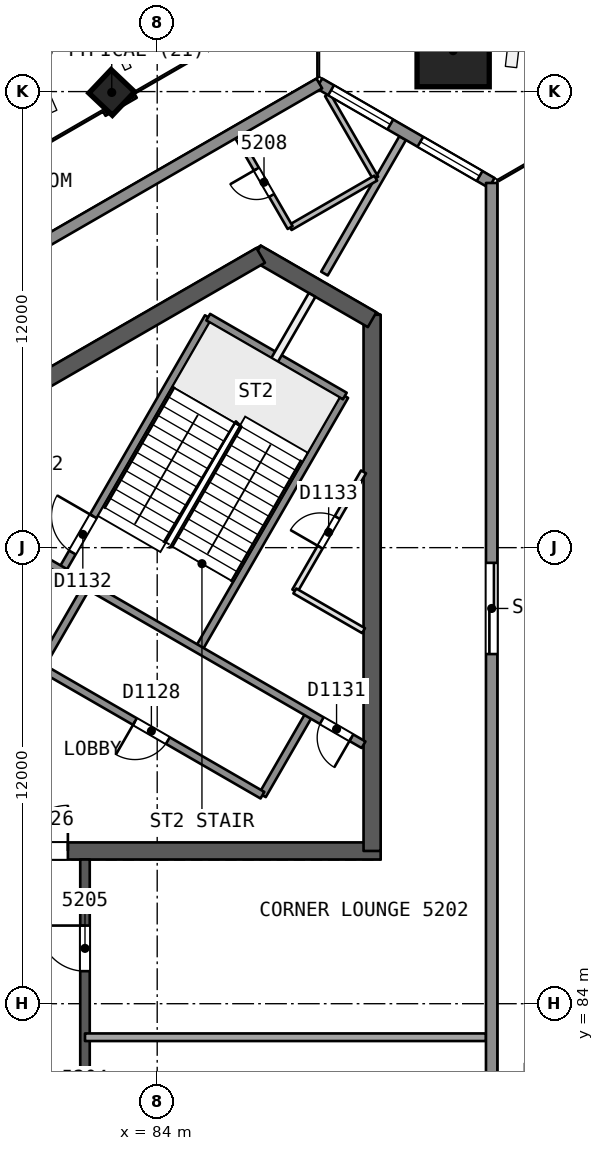
"""IFC4 building model, lengths in metres.
Left out: names, types, materials, properties, quantities, classifications, styles, units other than length and angle.
Written with IfcOpenShell. Run it as: python <this file> out.ifc"""

import sys

from ifc_helpers import new_model, si_unit, direction, frame, frame_2d, origin, origin_2d, place, context, subcontext, project, spatial, rectangle, extrude, element, fill, save


model = new_model("IFC4")
c1 = context("Model", 3, precision=1e-05, world=origin(), true_north=direction((0.0, 1.0)))
c2 = subcontext(c1, "Body", "Model", "MODEL_VIEW")
j1 = project(units=[si_unit("LENGTHUNIT", "METRE"), si_unit("PLANEANGLEUNIT", "RADIAN")], contexts=[c1])
p1 = place(None, origin())
s1 = spatial("IfcSite", under=j1, at=p1, CompositionType="ELEMENT")
p2 = place(p1, origin())
s2 = spatial("IfcBuilding", under=s1, at=p2, CompositionType="ELEMENT")
p3 = place(p2, frame((0.0, 0.0, 213.2)))
s3 = spatial("IfcBuildingStorey", under=s2, at=p3, CompositionType="ELEMENT", Elevation=213.2)
p4 = place(p3, frame((79.63, 88.019, 0.0), z_axis=(0.0, 0.0, 1.0), x_axis=(1.0, 0.0, 0.0)))
e1 = element("IfcWall", 1, at=p4, inside=s3, PredefinedType="SHEAR", context=c2, shape_type="SweptSolid", body=[
    extrude(rectangle(XDim=10.25, YDim=0.45, at=frame_2d((5.125, 0.0))), origin(), (0.0, 0.0, 1.0), 3.7),
])
p5 = place(p4, frame((0.82, 0.0, 0.0)))
e2 = element("IfcOpeningElement", 2, at=p5, cuts=e1, PredefinedType="OPENING", context=c2, shape_type="SweptSolid", body=[
    extrude(rectangle(XDim=1.2, YDim=2.1, at=frame_2d((0.6, 1.05))), frame((0.0, 0.235, 0.0), z_axis=(0.0, -1.0, 0.0), x_axis=(1.0, 0.0, 0.0)), (0.0, 0.0, 1.0), 0.471),
])
p6 = place(p3, frame((89.655, 88.019, 0.0), z_axis=(0.0, 0.0, 1.0), x_axis=(0.0, 1.0, 0.0)))
e3 = element("IfcWall", 3, at=p6, inside=s3, PredefinedType="SHEAR", context=c2, shape_type="SweptSolid", body=[
    extrude(rectangle(XDim=14.108, YDim=0.45, at=frame_2d((7.054, 0.0))), origin(), (0.0, 0.0, 1.0), 3.7),
])
p7 = place(p3, frame((89.655, 101.998, 0.0), z_axis=(0.0, 0.0, 1.0), x_axis=(-0.866042179588, 0.49997094233, 0.0)))
e4 = element("IfcWall", 4, at=p7, inside=s3, PredefinedType="SHEAR", context=c2, shape_type="SweptSolid", body=[
    extrude(rectangle(XDim=3.515, YDim=0.45, at=frame_2d((1.758, 0.0))), origin(), (0.0, 0.0, 1.0), 3.7),
])
p8 = place(p3, frame((86.723, 103.69, 0.0), z_axis=(0.0, 0.0, 1.0), x_axis=(-0.866022713978, -0.500004658852, 0.0)))
e5 = element("IfcWall", 5, at=p8, inside=s3, PredefinedType="SHEAR", context=c2, shape_type="SweptSolid", body=[
    extrude(rectangle(XDim=14.203, YDim=0.45, at=frame_2d((7.102, 0.0))), origin(), (0.0, 0.0, 1.0), 3.7),
])
p9 = place(p3, frame((82.1, 72.206, 0.0), z_axis=(0.0, 0.0, 1.0), x_axis=(0.0, 1.0, 0.0)))
e6 = element("IfcWall", 6, at=p9, inside=s3, PredefinedType="SHEAR", context=c2, shape_type="SweptSolid", body=[
    extrude(rectangle(XDim=15.588, YDim=0.25, at=frame_2d((7.794, 0.0))), origin(), (0.0, 0.0, 1.0), 3.3),
])
p10 = place(p9, frame((2.618, 0.0, 0.0)))
e7 = element("IfcOpeningElement", 7, at=p10, cuts=e6, PredefinedType="OPENING", context=c2, shape_type="SweptSolid", body=[
    extrude(rectangle(XDim=1.0, YDim=2.1, at=frame_2d((0.5, 1.05))), frame((0.0, 0.135, 0.0), z_axis=(0.0, -1.0, 0.0), x_axis=(1.0, 0.0, 0.0)), (0.0, 0.0, 1.0), 0.271),
])
p11 = place(p9, frame((7.974, 0.0, 0.0)))
e8 = element("IfcOpeningElement", 8, at=p11, cuts=e6, PredefinedType="OPENING", context=c2, shape_type="SweptSolid", body=[
    extrude(rectangle(XDim=1.2, YDim=2.4, at=frame_2d((0.6, 1.2))), frame((0.0, 0.135, 0.0), z_axis=(0.0, -1.0, 0.0), x_axis=(1.0, 0.0, 0.0)), (0.0, 0.0, 1.0), 0.271),
])
p12 = place(p9, frame((12.65, 0.0, 0.0)))
e9 = element("IfcOpeningElement", 9, at=p12, cuts=e6, PredefinedType="OPENING", context=c2, shape_type="SweptSolid", body=[
    extrude(rectangle(XDim=1.2, YDim=2.4, at=frame_2d((0.6, 1.2))), frame((0.0, 0.135, 0.0), z_axis=(0.0, -1.0, 0.0), x_axis=(1.0, 0.0, 0.0)), (0.0, 0.0, 1.0), 0.271),
])
p13 = place(p3, frame((91.809, 109.114, 0.0), z_axis=(-0.017607001884, -0.030531992032, 0.999378702468), x_axis=(0.866280455458, -0.499557977108, 1.01498e-07)))
e10 = element("IfcColumn", 10, at=p13, inside=s3, PredefinedType="COLUMN", context=c2, shape_type="SweptSolid", body=[
    extrude(rectangle(XDim=1.9, YDim=1.9, at=origin_2d()), origin(), (0.0, 0.0, 1.0), 3.702),
])
p14 = place(p3, frame((82.814, 108.011, 0.0), z_axis=(-0.00837646992, -0.028097450282, 0.999570091609), x_axis=(0.866168540849, 0.499298149106, 0.021293593943)))
e11 = element("IfcColumn", 11, at=p14, inside=s3, PredefinedType="COLUMN", context=c2, shape_type="SweptSolid", body=[
    extrude(rectangle(XDim=0.85, YDim=0.85, at=origin_2d()), origin(), (0.0, 0.0, 1.0), 3.702),
])
p15 = place(p3, frame((92.652, 83.118, 0.0), z_axis=(0.0, 0.0, 1.0), x_axis=(-1.0, 0.0, 0.0)))
e12 = element("IfcWall", 12, at=p15, inside=s3, PredefinedType="PARTITIONING", context=c2, shape_type="SweptSolid", body=[
    extrude(rectangle(XDim=10.552, YDim=0.2, at=frame_2d((5.276, 0.0))), origin(), (0.0, 0.0, 1.0), 3.3),
])
p16 = place(p3, frame((90.459, 106.776, 0.0), z_axis=(0.0, 0.0, 1.0), x_axis=(-0.499979154163, -0.8660374388, 0.0)))
e13 = element("IfcWall", 13, at=p16, inside=s3, PredefinedType="PARTITIONING", context=c2, shape_type="SweptSolid", body=[
    extrude(rectangle(XDim=4.116, YDim=0.2, at=frame_2d((2.058, 0.0))), origin(), (0.0, 0.0, 1.0), 3.3),
])
p17 = place(p3, frame((88.483, 107.917, 0.0), z_axis=(0.0, 0.0, 1.0), x_axis=(0.499983796486, -0.866034758685, 0.0)))
e14 = element("IfcWall", 14, at=p17, inside=s3, PredefinedType="PARTITIONING", context=c2, shape_type="SweptSolid", body=[
    extrude(rectangle(XDim=2.534, YDim=0.15, at=frame_2d((1.267, 0.0))), origin(), (0.0, 0.0, 1.0), 3.3),
])
p18 = place(p3, frame((89.75, 105.723, 0.0), z_axis=(0.0, 0.0, 1.0), x_axis=(-0.866021400173, -0.500006934395, 0.0)))
e15 = element("IfcWall", 15, at=p18, inside=s3, PredefinedType="PARTITIONING", context=c2, shape_type="SweptSolid", body=[
    extrude(rectangle(XDim=2.6, YDim=0.15, at=frame_2d((1.3, 0.0))), origin(), (0.0, 0.0, 1.0), 3.3),
])
p19 = place(p3, frame((87.498, 104.423, 0.0), z_axis=(0.0, 0.0, 1.0), x_axis=(-0.499947816978, 0.86605552957, 0.0)))
e16 = element("IfcWall", 16, at=p19, inside=s3, PredefinedType="PARTITIONING", context=c2, shape_type="SweptSolid", body=[
    extrude(rectangle(XDim=2.751, YDim=0.15, at=frame_2d((1.375, 0.0))), origin(), (0.0, 0.0, 1.0), 3.3),
])
p20 = place(p19, frame((0.975, 0.0, 0.0)))
e17 = element("IfcOpeningElement", 17, at=p20, cuts=e16, PredefinedType="OPENING", context=c2, shape_type="SweptSolid", body=[
    extrude(rectangle(XDim=0.8, YDim=2.1, at=frame_2d((0.4, 1.05))), frame((0.0, 0.085, 0.0), z_axis=(0.0, -1.0, 0.0), x_axis=(1.0, 0.0, 0.0)), (0.0, 0.0, 1.0), 0.171),
])
p21 = place(p3, frame((88.266, 108.214, 0.0), z_axis=(0.0, 0.0, 1.0), x_axis=(0.866014017669, -0.500019720812, 0.0)))
e18 = element("IfcWall", 18, at=p21, inside=s3, PredefinedType="SOLIDWALL", context=c2, shape_type="SweptSolid", body=[
    extrude(rectangle(XDim=5.237, YDim=0.3, at=frame_2d((2.619, 0.0))), origin(), (0.0, 0.0, 1.0), 3.3),
])
p22 = place(p21, frame((3.071, 0.0, 0.9)))
e19 = element("IfcOpeningElement", 19, at=p22, cuts=e18, PredefinedType="OPENING", context=c2, shape_type="SweptSolid", body=[
    extrude(rectangle(XDim=1.8, YDim=1.5, at=frame_2d((0.9, 0.75))), frame((0.0, 0.161, 0.0), z_axis=(0.0, -1.0, 0.0), x_axis=(1.0, 0.0, 0.0)), (0.0, 0.0, 1.0), 0.321),
])
p23 = place(p21, frame((0.358, 0.0, 0.9)))
e20 = element("IfcOpeningElement", 20, at=p23, cuts=e18, PredefinedType="OPENING", context=c2, shape_type="SweptSolid", body=[
    extrude(rectangle(XDim=1.8, YDim=1.5, at=frame_2d((0.9, 0.75))), frame((0.0, 0.161, 0.0), z_axis=(0.0, -1.0, 0.0), x_axis=(1.0, 0.0, 0.0)), (0.0, 0.0, 1.0), 0.321),
])
p24 = place(p3, frame((92.801, 105.596, 0.0), z_axis=(0.0, 0.0, 1.0), x_axis=(0.0, -1.0, 0.0)))
e21 = element("IfcWall", 21, at=p24, inside=s3, PredefinedType="SOLIDWALL", context=c2, shape_type="SweptSolid", body=[
    extrude(rectangle(XDim=51.191, YDim=0.3, at=frame_2d((25.596, 0.0))), origin(), (0.0, 0.0, 1.0), 3.3),
])
p25 = place(p24, frame((9.996, 0.0, 0.0)))
e22 = element("IfcOpeningElement", 22, at=p25, cuts=e21, PredefinedType="OPENING", context=c2, shape_type="SweptSolid", body=[
    extrude(rectangle(XDim=2.4, YDim=2.4, at=frame_2d((1.2, 1.2))), frame((0.0, 0.161, 0.0), z_axis=(0.0, -1.0, 0.0), x_axis=(1.0, 0.0, 0.0)), (0.0, 0.0, 1.0), 0.321),
])
p26 = place(p24, frame((29.072, 0.0, 0.0)))
e23 = element("IfcOpeningElement", 23, at=p26, cuts=e21, PredefinedType="OPENING", context=c2, shape_type="SweptSolid", body=[
    extrude(rectangle(XDim=2.4, YDim=2.4, at=frame_2d((1.2, 1.2))), frame((0.0, 0.161, 0.0), z_axis=(0.0, -1.0, 0.0), x_axis=(1.0, 0.0, 0.0)), (0.0, 0.0, 1.0), 0.321),
])
p27 = place(p24, frame((39.819, 0.0, 0.0)))
e24 = element("IfcOpeningElement", 24, at=p27, cuts=e21, PredefinedType="OPENING", context=c2, shape_type="SweptSolid", body=[
    extrude(rectangle(XDim=2.4, YDim=2.4, at=frame_2d((1.2, 1.2))), frame((0.0, 0.161, 0.0), z_axis=(0.0, -1.0, 0.0), x_axis=(1.0, 0.0, 0.0)), (0.0, 0.0, 1.0), 0.321),
])
p28 = place(p24, frame((23.616, 0.0, 0.0)))
e25 = element("IfcOpeningElement", 25, at=p28, cuts=e21, PredefinedType="OPENING", context=c2, shape_type="SweptSolid", body=[
    extrude(rectangle(XDim=2.4, YDim=2.4, at=frame_2d((1.2, 1.2))), frame((0.0, 0.161, 0.0), z_axis=(0.0, -1.0, 0.0), x_axis=(1.0, 0.0, 0.0)), (0.0, 0.0, 1.0), 0.321),
])
p29 = place(p3, frame((43.933, 82.619, 0.0), z_axis=(0.0, 0.0, 1.0), x_axis=(0.866026349667, 0.49999836168, 0.0)))
e26 = element("IfcWall", 26, at=p29, inside=s3, PredefinedType="SOLIDWALL", context=c2, shape_type="SweptSolid", body=[
    extrude(rectangle(XDim=51.192, YDim=0.3, at=frame_2d((25.596, 0.0))), origin(), (0.0, 0.0, 1.0), 3.3),
])
p30 = place(p29, frame((24.552, 0.0, 0.0)))
e27 = element("IfcOpeningElement", 27, at=p30, cuts=e26, PredefinedType="OPENING", context=c2, shape_type="SweptSolid", body=[
    extrude(rectangle(XDim=2.4, YDim=2.4, at=frame_2d((1.2, 1.2))), frame((0.0, 0.161, 0.0), z_axis=(0.0, -1.0, 0.0), x_axis=(1.0, 0.0, 0.0)), (0.0, 0.0, 1.0), 0.321),
])
p31 = place(p29, frame((29.228, 0.0, 0.0)))
e28 = element("IfcOpeningElement", 28, at=p31, cuts=e26, PredefinedType="OPENING", context=c2, shape_type="SweptSolid", body=[
    extrude(rectangle(XDim=2.4, YDim=2.4, at=frame_2d((1.2, 1.2))), frame((0.0, 0.161, 0.0), z_axis=(0.0, -1.0, 0.0), x_axis=(1.0, 0.0, 0.0)), (0.0, 0.0, 1.0), 0.321),
])
p32 = place(p29, frame((39.819, 0.0, 0.0)))
e29 = element("IfcOpeningElement", 29, at=p32, cuts=e26, PredefinedType="OPENING", context=c2, shape_type="SweptSolid", body=[
    extrude(rectangle(XDim=2.4, YDim=2.4, at=frame_2d((1.2, 1.2))), frame((0.0, 0.161, 0.0), z_axis=(0.0, -1.0, 0.0), x_axis=(1.0, 0.0, 0.0)), (0.0, 0.0, 1.0), 0.321),
])
p33 = place(p29, frame((19.719, 0.0, 0.0)))
e30 = element("IfcOpeningElement", 30, at=p33, cuts=e26, PredefinedType="OPENING", context=c2, shape_type="SweptSolid", body=[
    extrude(rectangle(XDim=2.4, YDim=2.4, at=frame_2d((1.2, 1.2))), frame((0.0, 0.161, 0.0), z_axis=(0.0, -1.0, 0.0), x_axis=(1.0, 0.0, 0.0)), (0.0, 0.0, 1.0), 0.321),
])
p34 = place(p29, frame((8.993, 0.0, 0.0)))
e31 = element("IfcOpeningElement", 31, at=p34, cuts=e26, PredefinedType="OPENING", context=c2, shape_type="SweptSolid", body=[
    extrude(rectangle(XDim=2.4, YDim=2.4, at=frame_2d((1.2, 1.2))), frame((0.0, 0.161, 0.0), z_axis=(0.0, -1.0, 0.0), x_axis=(1.0, 0.0, 0.0)), (0.0, 0.0, 1.0), 0.321),
])
p35 = place(p3, frame((86.77, 89.486, 0.0), z_axis=(0.0, 0.0, 1.0), x_axis=(0.499961042966, 0.86604789447, 0.0)))
e32 = element("IfcWall", 32, at=p35, inside=s3, PredefinedType="SOLIDWALL", context=c2, shape_type="SweptSolid", body=[
    extrude(rectangle(XDim=2.48, YDim=0.2, at=frame_2d((1.24, 0.0))), origin(), (0.0, 0.0, 1.0), 3.3),
])
p36 = place(p3, frame((87.621, 94.86, 0.0), z_axis=(0.0, 0.0, 1.0), x_axis=(0.499993116331, 0.866029378036, 0.0)))
e33 = element("IfcWall", 33, at=p36, inside=s3, PredefinedType="PARTITIONING", context=c2, shape_type="SweptSolid", body=[
    extrude(rectangle(XDim=3.618, YDim=0.15, at=frame_2d((1.809, 0.0))), origin(), (0.0, 0.0, 1.0), 3.3),
])
p37 = place(p36, frame((1.332, 0.0, 0.0)))
e34 = element("IfcOpeningElement", 34, at=p37, cuts=e33, PredefinedType="OPENING", context=c2, shape_type="SweptSolid", body=[
    extrude(rectangle(XDim=0.9, YDim=2.1, at=frame_2d((0.45, 1.05))), frame((0.0, 0.085, 0.0), z_axis=(0.0, -1.0, 0.0), x_axis=(1.0, 0.0, 0.0)), (0.0, 0.0, 1.0), 0.171),
])
p38 = place(p3, frame((85.087, 93.321, 0.0), z_axis=(0.0, 0.0, 1.0), x_axis=(0.500019787375, 0.866013979237, 0.0)))
e35 = element("IfcWall", 35, at=p38, inside=s3, PredefinedType="SOLIDWALL", context=c2, shape_type="SweptSolid", body=[
    extrude(rectangle(XDim=7.7, YDim=0.2, at=frame_2d((3.85, 0.0))), origin(), (0.0, 0.0, 1.0), 3.3),
])
p39 = place(p3, frame((87.09, 100.94, 0.0), z_axis=(0.0, 0.0, 1.0), x_axis=(0.500011643316, 0.866018681408, 0.0)))
e36 = element("IfcWall", 36, at=p39, inside=s3, PredefinedType="PARTITIONING", context=c2, shape_type="SweptSolid", body=[
    extrude(rectangle(XDim=1.973, YDim=0.2, at=frame_2d((0.987, 0.0))), origin(), (0.0, 0.0, 1.0), 3.3),
])
p40 = place(p3, frame((80.924, 92.861, 0.0), z_axis=(0.0, 0.0, 1.0), x_axis=(0.499961042966, 0.86604789447, 0.0)))
e37 = element("IfcWall", 37, at=p40, inside=s3, PredefinedType="SOLIDWALL", context=c2, shape_type="SweptSolid", body=[
    extrude(rectangle(XDim=2.48, YDim=0.2, at=frame_2d((1.24, 0.0))), origin(), (0.0, 0.0, 1.0), 3.3),
])
p41 = place(p3, frame((81.493, 95.396, 0.0), z_axis=(0.0, 0.0, 1.0), x_axis=(0.500006057782, 0.866021906294, 0.0)))
e38 = element("IfcWall", 38, at=p41, inside=s3, PredefinedType="SOLIDWALL", context=c2, shape_type="SweptSolid", body=[
    extrude(rectangle(XDim=7.7, YDim=0.2, at=frame_2d((3.85, 0.0))), origin(), (0.0, 0.0, 1.0), 3.3),
])
p42 = place(p41, frame((0.55, 0.0, 0.0)))
e39 = element("IfcOpeningElement", 39, at=p42, cuts=e38, PredefinedType="OPENING", context=c2, shape_type="SweptSolid", body=[
    extrude(rectangle(XDim=1.1, YDim=2.1, at=frame_2d((0.55, 1.05))), frame((0.0, 0.11, 0.0), z_axis=(0.0, -1.0, 0.0), x_axis=(1.0, 0.0, 0.0)), (0.0, 0.0, 1.0), 0.221),
])
p43 = place(p3, frame((86.77, 89.486, 0.0), z_axis=(0.0, 0.0, 1.0), x_axis=(-0.86601811187, 0.500012629753, 0.0)))
e40 = element("IfcWall", 40, at=p43, inside=s3, PredefinedType="SOLIDWALL", context=c2, shape_type="SweptSolid", body=[
    extrude(rectangle(XDim=10.9, YDim=0.2, at=frame_2d((5.45, 0.0))), origin(), (0.0, 0.0, 1.0), 3.3),
])
p44 = place(p43, frame((2.875, 0.0, 0.0)))
e41 = element("IfcOpeningElement", 41, at=p44, cuts=e40, PredefinedType="OPENING", context=c2, shape_type="SweptSolid", body=[
    extrude(rectangle(XDim=1.0, YDim=2.1, at=frame_2d((0.5, 1.05))), frame((0.0, 0.11, 0.0), z_axis=(0.0, -1.0, 0.0), x_axis=(1.0, 0.0, 0.0)), (0.0, 0.0, 1.0), 0.221),
])
p45 = place(p43, frame((7.375, 0.0, 0.0)))
e42 = element("IfcOpeningElement", 42, at=p45, cuts=e40, PredefinedType="OPENING", context=c2, shape_type="SweptSolid", body=[
    extrude(rectangle(XDim=1.0, YDim=2.1, at=frame_2d((0.5, 1.05))), frame((0.0, 0.11, 0.0), z_axis=(0.0, -1.0, 0.0), x_axis=(1.0, 0.0, 0.0)), (0.0, 0.0, 1.0), 0.221),
])
p46 = place(p3, frame((89.43, 90.814, 0.0), z_axis=(0.0, 0.0, 1.0), x_axis=(-0.866018983788, 0.500011119594, 0.0)))
e43 = element("IfcWall", 43, at=p46, inside=s3, PredefinedType="SOLIDWALL", context=c2, shape_type="SweptSolid", body=[
    extrude(rectangle(XDim=10.64, YDim=0.2, at=frame_2d((5.32, 0.0))), origin(), (0.0, 0.0, 1.0), 3.3),
])
p47 = place(p46, frame((0.37, 0.0, 0.0)))
e44 = element("IfcOpeningElement", 44, at=p47, cuts=e43, PredefinedType="OPENING", context=c2, shape_type="SweptSolid", body=[
    extrude(rectangle(XDim=0.9, YDim=2.1, at=frame_2d((0.45, 1.05))), frame((0.0, 0.11, 0.0), z_axis=(0.0, -1.0, 0.0), x_axis=(1.0, 0.0, 0.0)), (0.0, 0.0, 1.0), 0.221),
])
p48 = place(p3, frame((89.43, 93.816, 0.0), z_axis=(0.0, 0.0, 1.0), x_axis=(-0.866004557827, 0.500036104519, 0.0)))
e45 = element("IfcWall", 45, at=p48, inside=s3, PredefinedType="PARTITIONING", context=c2, shape_type="SweptSolid", body=[
    extrude(rectangle(XDim=2.089, YDim=0.15, at=frame_2d((1.044, 0.0))), origin(), (0.0, 0.0, 1.0), 3.3),
])
p49 = place(p3, frame((88.937, 99.99, 0.0), z_axis=(0.0, 0.0, 1.0), x_axis=(-0.866004344652, 0.500036473714, 0.0)))
e46 = element("IfcWall", 46, at=p49, inside=s3, PredefinedType="SOLIDWALL", context=c2, shape_type="SweptSolid", body=[
    extrude(rectangle(XDim=4.15, YDim=0.2, at=frame_2d((2.075, 0.0))), origin(), (0.0, 0.0, 1.0), 3.3),
])
p50 = place(p12, origin())
e47 = element("IfcDoor", 47, at=p50, inside=s3, OperationType="SINGLE_SWING_RIGHT", PredefinedType="NOTDEFINED", context=c2, shape_type="SweptSolid", body=[
    extrude(rectangle(XDim=1.2, YDim=2.4, at=frame_2d((0.6, 1.2))), frame((0.0, 0.025, 0.0), z_axis=(0.0, -1.0, 0.0), x_axis=(1.0, 0.0, 0.0)), (0.0, 0.0, 1.0), 0.05),
])
fill(e9, e47)
p51 = place(p20, origin())
e48 = element("IfcDoor", 48, at=p51, inside=s3, OperationType="SINGLE_SWING_RIGHT", PredefinedType="NOTDEFINED", context=c2, shape_type="SweptSolid", body=[
    extrude(rectangle(XDim=0.8, YDim=2.1, at=frame_2d((0.4, 1.05))), frame((0.0, 0.025, 0.0), z_axis=(0.0, -1.0, 0.0), x_axis=(1.0, 0.0, 0.0)), (0.0, 0.0, 1.0), 0.05),
])
fill(e17, e48)
p52 = place(p22, origin())
e49 = element("IfcWindow", 49, at=p52, inside=s3, PartitioningType="SINGLE_PANEL", PredefinedType="WINDOW", context=c2, shape_type="SweptSolid", body=[
    extrude(rectangle(XDim=1.8, YDim=1.5, at=frame_2d((0.9, 0.75))), frame((0.0, 0.03, 0.0), z_axis=(0.0, -1.0, 0.0), x_axis=(1.0, 0.0, 0.0)), (0.0, 0.0, 1.0), 0.06),
])
fill(e19, e49)
p53 = place(p23, origin())
e50 = element("IfcWindow", 50, at=p53, inside=s3, PartitioningType="SINGLE_PANEL", PredefinedType="WINDOW", context=c2, shape_type="SweptSolid", body=[
    extrude(rectangle(XDim=1.8, YDim=1.5, at=frame_2d((0.9, 0.75))), frame((0.0, 0.03, 0.0), z_axis=(0.0, -1.0, 0.0), x_axis=(1.0, 0.0, 0.0)), (0.0, 0.0, 1.0), 0.06),
])
fill(e20, e50)
p54 = place(p25, origin())
e51 = element("IfcDoor", 51, at=p54, inside=s3, OperationType="SLIDING_TO_LEFT", PredefinedType="NOTDEFINED", context=c2, shape_type="SweptSolid", body=[
    extrude(rectangle(XDim=2.4, YDim=2.4, at=frame_2d((1.2, 1.2))), frame((0.0, 0.025, 0.0), z_axis=(0.0, -1.0, 0.0), x_axis=(1.0, 0.0, 0.0)), (0.0, 0.0, 1.0), 0.05),
])
fill(e22, e51)
p55 = place(p5, origin())
e52 = element("IfcDoor", 52, at=p55, inside=s3, OperationType="SINGLE_SWING_RIGHT", PredefinedType="NOTDEFINED", context=c2, shape_type="SweptSolid", body=[
    extrude(rectangle(XDim=1.2, YDim=2.1, at=frame_2d((0.6, 1.05))), frame((0.0, 0.025, 0.0), z_axis=(0.0, -1.0, 0.0), x_axis=(1.0, 0.0, 0.0)), (0.0, 0.0, 1.0), 0.05),
])
fill(e2, e52)
p56 = place(p44, origin())
e53 = element("IfcDoor", 53, at=p56, inside=s3, OperationType="SINGLE_SWING_RIGHT", PredefinedType="NOTDEFINED", context=c2, shape_type="SweptSolid", body=[
    extrude(rectangle(XDim=1.0, YDim=2.1, at=frame_2d((0.5, 1.05))), frame((0.0, 0.025, 0.0), z_axis=(0.0, -1.0, 0.0), x_axis=(1.0, 0.0, 0.0)), (0.0, 0.0, 1.0), 0.05),
])
fill(e41, e53)
p57 = place(p47, origin())
e54 = element("IfcDoor", 54, at=p57, inside=s3, OperationType="SINGLE_SWING_LEFT", PredefinedType="NOTDEFINED", context=c2, shape_type="SweptSolid", body=[
    extrude(rectangle(XDim=0.9, YDim=2.1, at=frame_2d((0.45, 1.05))), frame((0.0, 0.025, 0.0), z_axis=(0.0, -1.0, 0.0), x_axis=(1.0, 0.0, 0.0)), (0.0, 0.0, 1.0), 0.05),
])
fill(e44, e54)
p58 = place(p42, origin())
e55 = element("IfcDoor", 55, at=p58, inside=s3, OperationType="SINGLE_SWING_RIGHT", PredefinedType="NOTDEFINED", context=c2, shape_type="SweptSolid", body=[
    extrude(rectangle(XDim=1.1, YDim=2.1, at=frame_2d((0.55, 1.05))), frame((0.0, 0.025, 0.0), z_axis=(0.0, -1.0, 0.0), x_axis=(1.0, 0.0, 0.0)), (0.0, 0.0, 1.0), 0.05),
])
fill(e39, e55)
p59 = place(p37, origin())
e56 = element("IfcDoor", 56, at=p59, inside=s3, OperationType="SINGLE_SWING_LEFT", PredefinedType="NOTDEFINED", context=c2, shape_type="SweptSolid", body=[
    extrude(rectangle(XDim=0.9, YDim=2.1, at=frame_2d((0.45, 1.05))), frame((0.0, 0.025, 0.0), z_axis=(0.0, -1.0, 0.0), x_axis=(1.0, 0.0, 0.0)), (0.0, 0.0, 1.0), 0.05),
])
fill(e34, e56)
save(model, sys.argv[1])
